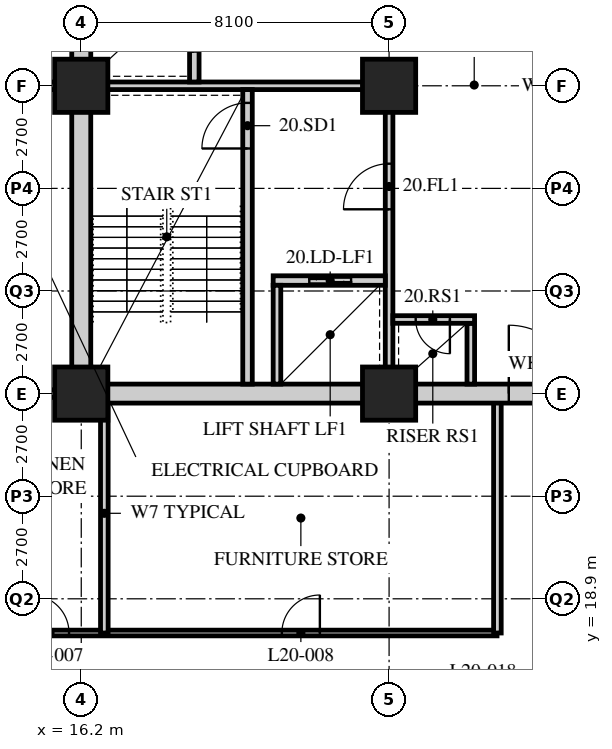
"""IFC4 building model, lengths in metres.
Left out: names, types, materials, properties, quantities, classifications, styles, units other than length and angle.
Written with IfcOpenShell. Run it as: python <this file> out.ifc"""

import sys

from ifc_helpers import new_model, si_unit, direction, frame, frame_2d, origin, origin_2d, place, context, subcontext, project, spatial, rectangle, hollow_rectangle, extrude, element, fill, save


model = new_model("IFC4")
c1 = context("Model", 3, precision=1e-05, world=origin(), true_north=direction((0.0, 1.0)))
c2 = subcontext(c1, "Body", "Model", "MODEL_VIEW")
j1 = project(units=[si_unit("LENGTHUNIT", "METRE"), si_unit("PLANEANGLEUNIT", "RADIAN")], contexts=[c1])
p1 = place(None, origin())
s1 = spatial("IfcSite", under=j1, at=p1, CompositionType="ELEMENT")
p2 = place(p1, origin())
s2 = spatial("IfcBuilding", under=s1, at=p2, CompositionType="ELEMENT")
p3 = place(p2, frame((0.0, 0.0, 80.6)))
s3 = spatial("IfcBuildingStorey", under=s2, at=p3, CompositionType="ELEMENT", Elevation=80.6)
for number, where, z_axis, x_axis in (
    (1, (16.2, 24.3, 0.0), (0.0, 0.0, 1.0), (1.0, 0.0, 0.0)),
    (2, (16.2, 32.4, 0.0), (0.0, 0.0, 1.0), (1.0, 0.0, 0.0)),
    (3, (24.3, 24.3, 0.0), (0.0, 0.0, 1.0), (1.0, 0.0, 0.0)),
    (4, (24.3, 32.4, 0.0), (0.0, 0.0, 1.0), (1.0, 0.0, 0.0)),
):
    element("IfcColumn", number, at=place(p3, frame(where, z_axis=z_axis, x_axis=x_axis)), inside=s3, PredefinedType="COLUMN", context=c2, shape_type="SweptSolid", body=[
        extrude(hollow_rectangle(XDim=1.4, YDim=1.4, WallThickness=0.12, at=origin_2d()), origin(), (0.0, 0.0, 1.0), 3.4),
    ])
p4 = place(p3, frame((13.95, 18.0, 0.0), z_axis=(0.0, 0.0, 1.0), x_axis=(1.0, 0.0, 0.0)))
e5 = element("IfcWall", 5, at=p4, inside=s3, PredefinedType="PARTITIONING", context=c2, shape_type="SweptSolid", body=[
    extrude(rectangle(XDim=13.19, YDim=0.15, at=frame_2d((6.595, 0.0))), origin(), (0.0, 0.0, 1.0), 3.19),
])
p5 = place(p4, frame((0.929, 0.0, 0.0)))
e6 = element("IfcOpeningElement", 6, at=p5, cuts=e5, PredefinedType="OPENING", context=c2, shape_type="SweptSolid", body=[
    extrude(rectangle(XDim=1.0, YDim=2.1, at=frame_2d((0.5, 1.05))), frame((0.0, 0.085, 0.0), z_axis=(0.0, -1.0, 0.0), x_axis=(1.0, 0.0, 0.0)), (0.0, 0.0, 1.0), 0.17),
])
p6 = place(p4, frame((7.529, 0.0, 0.0)))
e7 = element("IfcOpeningElement", 7, at=p6, cuts=e5, PredefinedType="OPENING", context=c2, shape_type="SweptSolid", body=[
    extrude(rectangle(XDim=1.0, YDim=2.1, at=frame_2d((0.5, 1.05))), frame((0.0, 0.085, 0.0), z_axis=(0.0, -1.0, 0.0), x_axis=(1.0, 0.0, 0.0)), (0.0, 0.0, 1.0), 0.17),
])
p7 = place(p3, frame((13.95, 32.4, 0.0), z_axis=(0.0, 0.0, 1.0), x_axis=(1.0, 0.0, 0.0)))
e8 = element("IfcWall", 8, at=p7, inside=s3, PredefinedType="SOLIDWALL", context=c2, shape_type="SweptSolid", body=[
    extrude(rectangle(XDim=2.25, YDim=0.2, at=frame_2d((1.125, 0.0))), origin(), (0.0, 0.0, 1.0), 2.428),
])
for number, where, z_axis, x_axis in (
    (9, (16.807, 18.0, 0.0), (0.0, 0.0, 1.0), (0.0, 1.0, 0.0)),
    (10, (27.15, 18.0, 0.0), (0.0, 0.0, 1.0), (0.0, 1.0, 0.0)),
):
    element("IfcWall", number, at=place(p3, frame(where, z_axis=z_axis, x_axis=x_axis)), inside=s3, PredefinedType="SOLIDWALL", context=c2, shape_type="SweptSolid", body=[
        extrude(rectangle(XDim=6.3, YDim=0.2, at=frame_2d((3.15, 0.0))), origin(), (0.0, 0.0, 1.0), 3.19),
    ])
p8 = place(p3, frame((13.95, 24.3, 0.0), z_axis=(0.0, 0.0, 1.0), x_axis=(1.0, 0.0, 0.0)))
e11 = element("IfcWall", 11, at=p8, inside=s3, PredefinedType="SOLIDWALL", context=c2, shape_type="SweptSolid", body=[
    extrude(rectangle(XDim=2.25, YDim=0.2, at=frame_2d((1.125, 0.0))), origin(), (0.0, 0.0, 1.0), 2.428),
])
p9 = place(p3, frame((15.95, 24.3, 0.0), z_axis=(0.0, 0.0, 1.0), x_axis=(1.0, 0.0, 0.0)))
e12 = element("IfcWall", 12, at=p9, inside=s3, PredefinedType="SOLIDWALL", context=c2, shape_type="SweptSolid", body=[
    extrude(rectangle(XDim=24.8, YDim=0.5, at=frame_2d((12.4, 0.0))), origin(), (0.0, 0.0, 1.0), 2.428),
])
p10 = place(p9, frame((11.5, 0.0, 0.0)))
e13 = element("IfcOpeningElement", 13, at=p10, cuts=e12, PredefinedType="OPENING", context=c2, shape_type="SweptSolid", body=[
    extrude(rectangle(XDim=1.8, YDim=2.4, at=frame_2d((0.9, 1.2))), frame((0.0, 0.26, 0.0), z_axis=(0.0, -1.0, 0.0), x_axis=(1.0, 0.0, 0.0)), (0.0, 0.0, 1.0), 0.52),
])
p11 = place(p3, frame((16.2, 24.55, 0.0), z_axis=(0.0, 0.0, 1.0), x_axis=(0.0, 1.0, 0.0)))
e14 = element("IfcWall", 14, at=p11, inside=s3, PredefinedType="SOLIDWALL", context=c2, shape_type="SweptSolid", body=[
    extrude(rectangle(XDim=15.7, YDim=0.5, at=frame_2d((7.85, 0.0))), origin(), (0.0, 0.0, 1.0), 2.428),
])
p12 = place(p3, frame((16.45, 32.4, 0.0), z_axis=(0.0, 0.0, 1.0), x_axis=(1.0, 0.0, 0.0)))
e15 = element("IfcWall", 15, at=p12, inside=s3, PredefinedType="SOLIDWALL", context=c2, shape_type="SweptSolid", body=[
    extrude(rectangle(XDim=7.95, YDim=0.2, at=frame_2d((3.975, 0.0))), origin(), (0.0, 0.0, 1.0), 2.578),
])
p13 = place(p3, frame((24.3, 24.55, 0.0), z_axis=(0.0, 0.0, 1.0), x_axis=(0.0, 1.0, 0.0)))
e16 = element("IfcWall", 16, at=p13, inside=s3, PredefinedType="SOLIDWALL", context=c2, shape_type="SweptSolid", body=[
    extrude(rectangle(XDim=7.75, YDim=0.2, at=frame_2d((3.875, 0.0))), origin(), (0.0, 0.0, 1.0), 2.578),
])
p14 = place(p13, frame((4.6, 0.0, 0.0)))
e17 = element("IfcOpeningElement", 17, at=p14, cuts=e16, PredefinedType="OPENING", context=c2, shape_type="SweptSolid", body=[
    extrude(rectangle(XDim=1.2, YDim=2.1, at=frame_2d((0.6, 1.05))), frame((0.0, 0.11, 0.0), z_axis=(0.0, -1.0, 0.0), x_axis=(1.0, 0.0, 0.0)), (0.0, 0.0, 1.0), 0.22),
])
p15 = place(p3, frame((20.575, 24.55, 0.0), z_axis=(0.0, 0.0, 1.0), x_axis=(0.0, 1.0, 0.0)))
e18 = element("IfcWall", 18, at=p15, inside=s3, PredefinedType="SOLIDWALL", context=c2, shape_type="SweptSolid", body=[
    extrude(rectangle(XDim=7.75, YDim=0.25, at=frame_2d((3.875, 0.0))), origin(), (0.0, 0.0, 1.0), 3.19),
])
p16 = place(p15, frame((6.2, 0.0, 0.0)))
e19 = element("IfcOpeningElement", 19, at=p16, cuts=e18, PredefinedType="OPENING", context=c2, shape_type="SweptSolid", body=[
    extrude(rectangle(XDim=1.2, YDim=2.1, at=frame_2d((0.6, 1.05))), frame((0.0, 0.135, 0.0), z_axis=(0.0, -1.0, 0.0), x_axis=(1.0, 0.0, 0.0)), (0.0, 0.0, 1.0), 0.27),
])
p17 = place(p3, frame((21.25, 27.275, 0.0), z_axis=(0.0, 0.0, 1.0), x_axis=(1.0, 0.0, 0.0)))
e20 = element("IfcWall", 20, at=p17, inside=s3, PredefinedType="SOLIDWALL", context=c2, shape_type="SweptSolid", body=[
    extrude(rectangle(XDim=2.95, YDim=0.25, at=frame_2d((1.475, 0.0))), origin(), (0.0, 0.0, 1.0), 3.19),
])
p18 = place(p17, frame((0.95, 0.0, 0.0)))
e21 = element("IfcOpeningElement", 21, at=p18, cuts=e20, PredefinedType="OPENING", context=c2, shape_type="SweptSolid", body=[
    extrude(rectangle(XDim=1.1, YDim=2.4, at=frame_2d((0.55, 1.2))), frame((0.0, 0.135, 0.0), z_axis=(0.0, -1.0, 0.0), x_axis=(1.0, 0.0, 0.0)), (0.0, 0.0, 1.0), 0.27),
])
p19 = place(p3, frame((21.35, 24.55, 0.0), z_axis=(0.0, 0.0, 1.0), x_axis=(0.0, 1.0, 0.0)))
e22 = element("IfcWall", 22, at=p19, inside=s3, PredefinedType="SOLIDWALL", context=c2, shape_type="SweptSolid", body=[
    extrude(rectangle(XDim=2.6, YDim=0.2, at=frame_2d((1.3, 0.0))), origin(), (0.0, 0.0, 1.0), 3.19),
])
p20 = place(p3, frame((19.175, 32.5, 0.0), z_axis=(0.0, 0.0, 1.0), x_axis=(0.0, 1.0, 0.0)))
e23 = element("IfcWall", 23, at=p20, inside=s3, PredefinedType="SOLIDWALL", context=c2, shape_type="SweptSolid", body=[
    extrude(rectangle(XDim=7.75, YDim=0.25, at=frame_2d((3.875, 0.0))), origin(), (0.0, 0.0, 1.0), 3.19),
])
p21 = place(p20, frame((0.8, 0.0, 0.0)))
e24 = element("IfcOpeningElement", 24, at=p21, cuts=e23, PredefinedType="OPENING", context=c2, shape_type="SweptSolid", body=[
    extrude(rectangle(XDim=1.1, YDim=2.4, at=frame_2d((0.55, 1.2))), frame((0.0, 0.135, 0.0), z_axis=(0.0, -1.0, 0.0), x_axis=(1.0, 0.0, 0.0)), (0.0, 0.0, 1.0), 0.27),
])
p22 = place(p20, frame((3.4, 0.0, 0.0)))
e25 = element("IfcOpeningElement", 25, at=p22, cuts=e23, PredefinedType="OPENING", context=c2, shape_type="SweptSolid", body=[
    extrude(rectangle(XDim=1.1, YDim=2.4, at=frame_2d((0.55, 1.2))), frame((0.0, 0.135, 0.0), z_axis=(0.0, -1.0, 0.0), x_axis=(1.0, 0.0, 0.0)), (0.0, 0.0, 1.0), 0.27),
])
p23 = place(p20, frame((6.0, 0.0, 0.0)))
e26 = element("IfcOpeningElement", 26, at=p23, cuts=e23, PredefinedType="OPENING", context=c2, shape_type="SweptSolid", body=[
    extrude(rectangle(XDim=1.1, YDim=2.4, at=frame_2d((0.55, 1.2))), frame((0.0, 0.135, 0.0), z_axis=(0.0, -1.0, 0.0), x_axis=(1.0, 0.0, 0.0)), (0.0, 0.0, 1.0), 0.27),
])
p24 = place(p3, frame((26.45, 24.55, 0.0), z_axis=(0.0, 0.0, 1.0), x_axis=(0.0, 1.0, 0.0)))
e27 = element("IfcWall", 27, at=p24, inside=s3, PredefinedType="SOLIDWALL", context=c2, shape_type="SweptSolid", body=[
    extrude(rectangle(XDim=1.6, YDim=0.2, at=frame_2d((0.8, 0.0))), origin(), (0.0, 0.0, 1.0), 3.19),
])
p25 = place(p3, frame((24.4, 26.25, 0.0), z_axis=(0.0, 0.0, 1.0), x_axis=(1.0, 0.0, 0.0)))
e28 = element("IfcWall", 28, at=p25, inside=s3, PredefinedType="SOLIDWALL", context=c2, shape_type="SweptSolid", body=[
    extrude(rectangle(XDim=2.15, YDim=0.2, at=frame_2d((1.075, 0.0))), origin(), (0.0, 0.0, 1.0), 3.19),
])
p26 = place(p25, frame((0.6, 0.0, 0.0)))
e29 = element("IfcOpeningElement", 29, at=p26, cuts=e28, PredefinedType="OPENING", context=c2, shape_type="SweptSolid", body=[
    extrude(rectangle(XDim=0.9, YDim=2.1, at=frame_2d((0.45, 1.05))), frame((0.0, 0.11, 0.0), z_axis=(0.0, -1.0, 0.0), x_axis=(1.0, 0.0, 0.0)), (0.0, 0.0, 1.0), 0.22),
])
p27 = place(p5, origin())
e30 = element("IfcDoor", 30, at=p27, inside=s3, OperationType="SINGLE_SWING_LEFT", PredefinedType="DOOR", context=c2, shape_type="SweptSolid", body=[
    extrude(rectangle(XDim=1.0, YDim=2.1, at=frame_2d((0.5, 1.05))), frame((0.0, 0.025, 0.0), z_axis=(0.0, -1.0, 0.0), x_axis=(1.0, 0.0, 0.0)), (0.0, 0.0, 1.0), 0.05),
])
fill(e6, e30)
p28 = place(p6, origin())
e31 = element("IfcDoor", 31, at=p28, inside=s3, OperationType="SINGLE_SWING_RIGHT", PredefinedType="DOOR", context=c2, shape_type="SweptSolid", body=[
    extrude(rectangle(XDim=1.0, YDim=2.1, at=frame_2d((0.5, 1.05))), frame((0.0, 0.025, 0.0), z_axis=(0.0, -1.0, 0.0), x_axis=(1.0, 0.0, 0.0)), (0.0, 0.0, 1.0), 0.05),
])
fill(e7, e31)
p29 = place(p16, origin())
e32 = element("IfcDoor", 32, at=p29, inside=s3, OperationType="SINGLE_SWING_LEFT", PredefinedType="DOOR", context=c2, shape_type="SweptSolid", body=[
    extrude(rectangle(XDim=1.2, YDim=2.1, at=frame_2d((0.6, 1.05))), frame((0.0, 0.025, 0.0), z_axis=(0.0, -1.0, 0.0), x_axis=(1.0, 0.0, 0.0)), (0.0, 0.0, 1.0), 0.05),
])
fill(e19, e32)
p30 = place(p14, origin())
e33 = element("IfcDoor", 33, at=p30, inside=s3, OperationType="SINGLE_SWING_LEFT", PredefinedType="DOOR", context=c2, shape_type="SweptSolid", body=[
    extrude(rectangle(XDim=1.2, YDim=2.1, at=frame_2d((0.6, 1.05))), frame((0.0, 0.025, 0.0), z_axis=(0.0, -1.0, 0.0), x_axis=(1.0, 0.0, 0.0)), (0.0, 0.0, 1.0), 0.05),
])
fill(e17, e33)
p31 = place(p26, origin())
e34 = element("IfcDoor", 34, at=p31, inside=s3, OperationType="SINGLE_SWING_LEFT", PredefinedType="DOOR", context=c2, shape_type="SweptSolid", body=[
    extrude(rectangle(XDim=0.9, YDim=2.1, at=frame_2d((0.45, 1.05))), frame((0.0, 0.025, 0.0), z_axis=(0.0, -1.0, 0.0), x_axis=(1.0, 0.0, 0.0)), (0.0, 0.0, 1.0), 0.05),
])
fill(e29, e34)
p32 = place(p18, origin())
e35 = element("IfcDoor", 35, at=p32, inside=s3, OperationType="DOUBLE_DOOR_SLIDING", PredefinedType="DOOR", context=c2, shape_type="SweptSolid", body=[
    extrude(rectangle(XDim=1.1, YDim=2.4, at=frame_2d((0.55, 1.2))), frame((0.0, 0.025, 0.0), z_axis=(0.0, -1.0, 0.0), x_axis=(1.0, 0.0, 0.0)), (0.0, 0.0, 1.0), 0.05),
])
fill(e21, e35)
p33 = place(p10, origin())
e36 = element("IfcDoor", 36, at=p33, inside=s3, OperationType="DOUBLE_DOOR_SINGLE_SWING", PredefinedType="DOOR", context=c2, shape_type="SweptSolid", body=[
    extrude(rectangle(XDim=1.8, YDim=2.4, at=frame_2d((0.9, 1.2))), frame((0.0, 0.025, 0.0), z_axis=(0.0, -1.0, 0.0), x_axis=(1.0, 0.0, 0.0)), (0.0, 0.0, 1.0), 0.05),
])
fill(e13, e36)
save(model, sys.argv[1])
